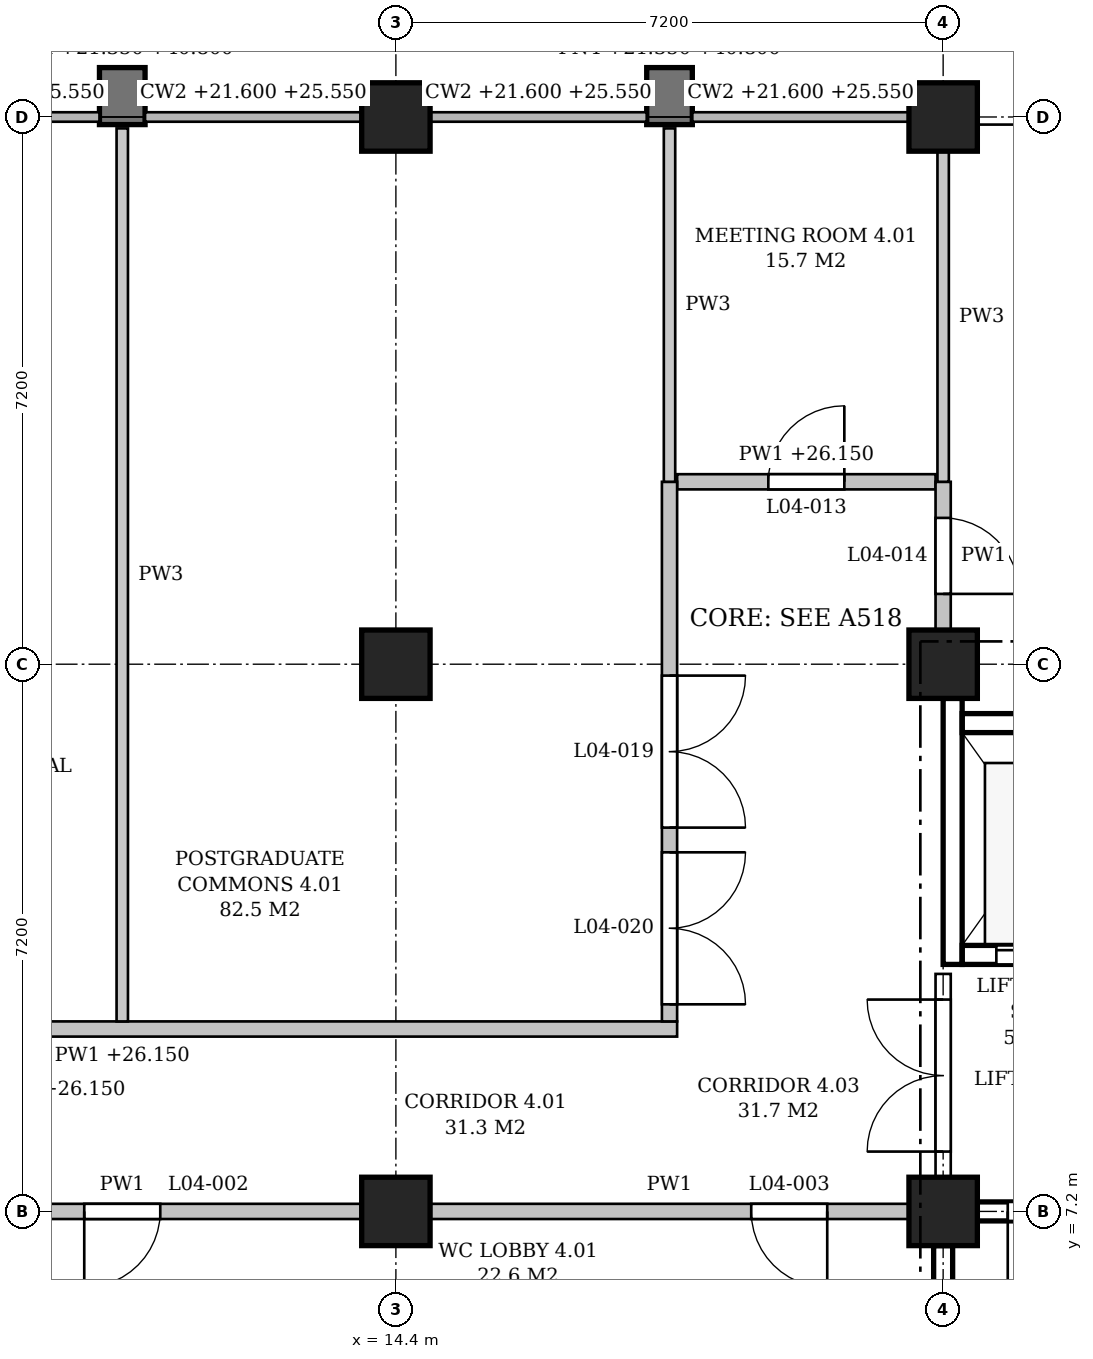
"""IFC4 building model, lengths in metres.
Left out: names, types, materials, properties, quantities, classifications, styles, units other than length and angle.
Written with IfcOpenShell. Run it as: python <this file> out.ifc"""

import sys

from ifc_helpers import new_model, si_unit, direction, frame, frame_2d, origin, origin_2d, place, context, subcontext, project, spatial, polyline, rectangle, outline, extrude, element, fill, save


model = new_model("IFC4")
c1 = context("Model", 3, precision=1e-05, world=origin(), true_north=direction((0.0, 1.0)))
c2 = subcontext(c1, "Body", "Model", "MODEL_VIEW")
j1 = project(units=[si_unit("LENGTHUNIT", "METRE"), si_unit("PLANEANGLEUNIT", "RADIAN")], contexts=[c1])
p1 = place(None, origin())
s1 = spatial("IfcSite", under=j1, at=p1, CompositionType="ELEMENT")
p2 = place(p1, origin())
s2 = spatial("IfcBuilding", under=s1, at=p2, CompositionType="ELEMENT")
p3 = place(p2, frame((0.0, 0.0, 21.6)))
s3 = spatial("IfcBuildingStorey", under=s2, at=p3, CompositionType="ELEMENT", Elevation=21.6)
for number, where, z_axis, x_axis in (
    (1, (14.4, 7.2, 0.0), (0.0, 0.0, 1.0), (1.0, 0.0, 0.0)),
    (2, (14.4, 14.4, 0.0), (0.0, 0.0, 1.0), (1.0, 0.0, 0.0)),
    (3, (14.4, 21.6, 0.0), (0.0, 0.0, 1.0), (1.0, 0.0, 0.0)),
    (4, (21.6, 7.2, 0.0), (0.0, 0.0, 1.0), (1.0, 0.0, 0.0)),
    (5, (21.6, 14.4, 0.0), (0.0, 0.0, 1.0), (1.0, 0.0, 0.0)),
    (6, (21.6, 21.6, 0.0), (0.0, 0.0, 1.0), (1.0, 0.0, 0.0)),
):
    element("IfcColumn", number, at=place(p3, frame(where, z_axis=z_axis, x_axis=x_axis)), inside=s3, PredefinedType="COLUMN", context=c2, shape_type="SweptSolid", body=[
        extrude(rectangle(XDim=0.9, YDim=0.9, at=origin_2d()), origin(), (0.0, 0.0, 1.0), 4.8),
    ])
for number, where, z_axis, x_axis in (
    (7, (18.0, 21.5, -0.25), (0.0, 0.0, 1.0), (0.0, 1.0, 0.0)),
    (8, (10.8, 21.5, -0.25), (0.0, 0.0, 1.0), (0.0, 1.0, 0.0)),
):
    element("IfcWall", number, at=place(p3, frame(where, z_axis=z_axis, x_axis=x_axis)), inside=s3, PredefinedType="POLYGONAL", context=c2, shape_type="SweptSolid", body=[
        extrude(outline(polyline([(0.75, 0.0), (0.75, 19.0), (0.45, 19.45), (0.3, 19.45), (0.3, 18.6), (0.0, 18.6), (0.0, 14.65), (0.35, 14.65), (0.35, 13.8), (0.0, 13.8), (0.0, 9.85), (0.35, 9.85), (0.35, 9.0), (0.0, 9.0), (0.0, 5.05), (0.35, 5.05), (0.35, 4.2), (0.0, 4.2), (0.0, 0.25), (0.35, 0.25), (0.35, 0.0), (0.75, 0.0)])), frame((0.0, 0.3, 0.0), z_axis=(0.0, -1.0, 0.0), x_axis=(1.0, 0.0, 0.0)), (0.0, 0.0, 1.0), 0.6),
    ])
p4 = place(p3, frame((22.05, 7.2, 0.0), z_axis=(0.0, 0.0, 1.0), x_axis=(1.0, 0.0, 0.0)))
e9 = element("IfcWall", 9, at=p4, inside=s3, PredefinedType="SHEAR", context=c2, shape_type="SweptSolid", body=[
    extrude(rectangle(XDim=6.3, YDim=0.25, at=frame_2d((3.15, 0.0))), origin(), (0.0, 0.0, 1.0), 3.8),
])
p5 = place(p4, frame((0.4, 0.0, 0.0)))
e10 = element("IfcOpeningElement", 10, at=p5, cuts=e9, PredefinedType="OPENING", context=c2, shape_type="SweptSolid", body=[
    extrude(rectangle(XDim=1.1, YDim=2.1, at=frame_2d((0.55, 1.05))), frame((0.0, 0.135, 0.0), z_axis=(0.0, -1.0, 0.0), x_axis=(1.0, 0.0, 0.0)), (0.0, 0.0, 1.0), 0.27),
])
p6 = place(p3, frame((21.6, 0.45, 0.0), z_axis=(0.0, 0.0, 1.0), x_axis=(0.0, 1.0, 0.0)))
e11 = element("IfcWall", 11, at=p6, inside=s3, PredefinedType="SHEAR", context=c2, shape_type="SweptSolid", body=[
    extrude(rectangle(XDim=6.3, YDim=0.25, at=frame_2d((3.15, 0.0))), origin(), (0.0, 0.0, 1.0), 3.8),
])
p7 = place(p3, frame((21.725, 10.45, -0.25), z_axis=(0.0, 0.0, 1.0), x_axis=(0.0, 1.0, 0.0)))
e12 = element("IfcWall", 12, at=p7, inside=s3, PredefinedType="SHEAR", context=c2, shape_type="SweptSolid", body=[
    extrude(rectangle(XDim=3.5, YDim=0.25, at=frame_2d((1.75, 0.0))), origin(), (0.0, 0.0, 1.0), 4.05),
])
p8 = place(p3, frame((21.85, 10.575, -0.25), z_axis=(0.0, 0.0, 1.0), x_axis=(1.0, 0.0, 0.0)))
e13 = element("IfcWall", 13, at=p8, inside=s3, PredefinedType="SHEAR", context=c2, shape_type="SweptSolid", body=[
    extrude(rectangle(XDim=2.0, YDim=0.25, at=frame_2d((1.0, 0.0))), origin(), (0.0, 0.0, 1.0), 4.8),
])
p9 = place(p8, frame((0.45, 0.0, 0.25)))
e14 = element("IfcOpeningElement", 14, at=p9, cuts=e13, PredefinedType="OPENING", context=c2, shape_type="SweptSolid", body=[
    extrude(rectangle(XDim=1.1, YDim=2.1, at=frame_2d((0.55, 1.05))), frame((0.0, 0.135, 0.0), z_axis=(0.0, -1.0, 0.0), x_axis=(1.0, 0.0, 0.0)), (0.0, 0.0, 1.0), 0.27),
])
p10 = place(p3, frame((21.85, 13.625, -0.25), z_axis=(0.0, 0.0, 1.0), x_axis=(1.0, 0.0, 0.0)))
e15 = element("IfcWall", 15, at=p10, inside=s3, PredefinedType="SHEAR", context=c2, shape_type="SweptSolid", body=[
    extrude(rectangle(XDim=2.0, YDim=0.25, at=frame_2d((1.0, 0.0))), origin(), (0.0, 0.0, 1.0), 4.8),
])
p11 = place(p3, frame((7.65, 7.2, 0.0), z_axis=(0.0, 0.0, 1.0), x_axis=(1.0, 0.0, 0.0)))
e16 = element("IfcWall", 16, at=p11, inside=s3, PredefinedType="PARTITIONING", context=c2, shape_type="SweptSolid", body=[
    extrude(rectangle(XDim=6.3, YDim=0.2, at=frame_2d((3.15, 0.0))), origin(), (0.0, 0.0, 1.0), 3.8),
])
p12 = place(p11, frame((2.65, 0.0, 0.0)))
e17 = element("IfcOpeningElement", 17, at=p12, cuts=e16, PredefinedType="OPENING", context=c2, shape_type="SweptSolid", body=[
    extrude(rectangle(XDim=1.0, YDim=2.1, at=frame_2d((0.5, 1.05))), frame((0.0, 0.11, 0.0), z_axis=(0.0, -1.0, 0.0), x_axis=(1.0, 0.0, 0.0)), (0.0, 0.0, 1.0), 0.22),
])
p13 = place(p3, frame((14.85, 7.2, 0.0), z_axis=(0.0, 0.0, 1.0), x_axis=(1.0, 0.0, 0.0)))
e18 = element("IfcWall", 18, at=p13, inside=s3, PredefinedType="PARTITIONING", context=c2, shape_type="SweptSolid", body=[
    extrude(rectangle(XDim=6.3, YDim=0.2, at=frame_2d((3.15, 0.0))), origin(), (0.0, 0.0, 1.0), 3.8),
])
p14 = place(p13, frame((4.225, 0.0, 0.0)))
e19 = element("IfcOpeningElement", 19, at=p14, cuts=e18, PredefinedType="OPENING", context=c2, shape_type="SweptSolid", body=[
    extrude(rectangle(XDim=1.0, YDim=2.1, at=frame_2d((0.5, 1.05))), frame((0.0, 0.11, 0.0), z_axis=(0.0, -1.0, 0.0), x_axis=(1.0, 0.0, 0.0)), (0.0, 0.0, 1.0), 0.22),
])
p15 = place(p3, frame((3.5, 9.6, 0.0), z_axis=(0.0, 0.0, 1.0), x_axis=(1.0, 0.0, 0.0)))
e20 = element("IfcWall", 20, at=p15, inside=s3, PredefinedType="PARTITIONING", context=c2, shape_type="SweptSolid", body=[
    extrude(outline(polyline([(0.0, 0.0), (14.6, 0.0), (14.6, 4.55), (11.15, 4.55), (11.15, 3.8), (10.65, 3.8), (10.65, 4.55), (3.95, 4.55), (3.95, 3.8), (3.45, 3.8), (3.45, 4.55), (0.0, 4.55), (0.0, 0.0)])), frame((0.0, 0.1, 0.0), z_axis=(0.0, -1.0, 0.0), x_axis=(1.0, 0.0, 0.0)), (0.0, 0.0, 1.0), 0.2),
])
p16 = place(p15, frame((1.4, 0.0, 0.0)))
e21 = element("IfcOpeningElement", 21, at=p16, cuts=e20, PredefinedType="OPENING", context=c2, shape_type="SweptSolid", body=[
    extrude(rectangle(XDim=1.0, YDim=2.1, at=frame_2d((0.5, 1.05))), frame((0.0, 0.11, 0.0), z_axis=(0.0, -1.0, 0.0), x_axis=(1.0, 0.0, 0.0)), (0.0, 0.0, 1.0), 0.22),
])
p17 = place(p15, frame((5.0, 0.0, 0.0)))
e22 = element("IfcOpeningElement", 22, at=p17, cuts=e20, PredefinedType="OPENING", context=c2, shape_type="SweptSolid", body=[
    extrude(rectangle(XDim=1.0, YDim=2.1, at=frame_2d((0.5, 1.05))), frame((0.0, 0.11, 0.0), z_axis=(0.0, -1.0, 0.0), x_axis=(1.0, 0.0, 0.0)), (0.0, 0.0, 1.0), 0.22),
])
p18 = place(p3, frame((18.1, 16.8, 0.0), z_axis=(0.0, 0.0, 1.0), x_axis=(1.0, 0.0, 0.0)))
e23 = element("IfcWall", 23, at=p18, inside=s3, PredefinedType="PARTITIONING", context=c2, shape_type="SweptSolid", body=[
    extrude(outline(polyline([(0.0, 0.0), (3.4, 0.0), (3.4, 3.8), (3.25, 3.8), (3.25, 4.55), (0.0, 4.55), (0.0, 0.0)])), frame((0.0, 0.1, 0.0), z_axis=(0.0, -1.0, 0.0), x_axis=(1.0, 0.0, 0.0)), (0.0, 0.0, 1.0), 0.2),
])
p19 = place(p18, frame((1.2, 0.0, 0.0)))
e24 = element("IfcOpeningElement", 24, at=p19, cuts=e23, PredefinedType="OPENING", context=c2, shape_type="SweptSolid", body=[
    extrude(rectangle(XDim=1.0, YDim=2.1, at=frame_2d((0.5, 1.05))), frame((0.0, 0.11, 0.0), z_axis=(0.0, -1.0, 0.0), x_axis=(1.0, 0.0, 0.0)), (0.0, 0.0, 1.0), 0.22),
])
p20 = place(p3, frame((10.8, 9.7, 0.0), z_axis=(0.0, 0.0, 1.0), x_axis=(0.0, 1.0, 0.0)))
e25 = element("IfcWall", 25, at=p20, inside=s3, PredefinedType="PARTITIONING", context=c2, shape_type="SweptSolid", body=[
    extrude(rectangle(XDim=11.75, YDim=0.15, at=frame_2d((5.875, 0.0))), origin(), (0.0, 0.0, 1.0), 3.8),
])
p21 = place(p3, frame((18.0, 9.7, 0.0), z_axis=(0.0, 0.0, 1.0), x_axis=(0.0, 1.0, 0.0)))
e26 = element("IfcWall", 26, at=p21, inside=s3, PredefinedType="PARTITIONING", context=c2, shape_type="SweptSolid", body=[
    extrude(outline(polyline([(0.0, 0.0), (7.1, 0.0), (7.1, 4.55), (4.95, 4.55), (4.95, 3.8), (4.45, 3.8), (4.45, 4.55), (0.0, 4.55), (0.0, 0.0)])), frame((0.0, 0.1, 0.0), z_axis=(0.0, -1.0, 0.0), x_axis=(1.0, 0.0, 0.0)), (0.0, 0.0, 1.0), 0.2),
])
p22 = place(p21, frame((2.55, 0.0, 0.0)))
e27 = element("IfcOpeningElement", 27, at=p22, cuts=e26, PredefinedType="OPENING", context=c2, shape_type="SweptSolid", body=[
    extrude(rectangle(XDim=2.0, YDim=2.1, at=frame_2d((1.0, 1.05))), frame((0.0, 0.11, 0.0), z_axis=(0.0, -1.0, 0.0), x_axis=(1.0, 0.0, 0.0)), (0.0, 0.0, 1.0), 0.22),
])
p23 = place(p21, frame((0.225, 0.0, 0.0)))
e28 = element("IfcOpeningElement", 28, at=p23, cuts=e26, PredefinedType="OPENING", context=c2, shape_type="SweptSolid", body=[
    extrude(rectangle(XDim=2.0, YDim=2.1, at=frame_2d((1.0, 1.05))), frame((0.0, 0.11, 0.0), z_axis=(0.0, -1.0, 0.0), x_axis=(1.0, 0.0, 0.0)), (0.0, 0.0, 1.0), 0.22),
])
p24 = place(p3, frame((18.0, 16.8, 0.0), z_axis=(0.0, 0.0, 1.0), x_axis=(0.0, 1.0, 0.0)))
e29 = element("IfcWall", 29, at=p24, inside=s3, PredefinedType="PARTITIONING", context=c2, shape_type="SweptSolid", body=[
    extrude(rectangle(XDim=4.65, YDim=0.15, at=frame_2d((2.325, 0.0))), origin(), (0.0, 0.0, 1.0), 3.8),
])
p25 = place(p3, frame((21.6, 7.65, 0.0), z_axis=(0.0, 0.0, 1.0), x_axis=(0.0, 1.0, 0.0)))
e30 = element("IfcWall", 30, at=p25, inside=s3, PredefinedType="PARTITIONING", context=c2, shape_type="SweptSolid", body=[
    extrude(rectangle(XDim=2.675, YDim=0.2, at=frame_2d((1.337, 0.0))), origin(), (0.0, 0.0, 1.0), 3.8),
])
p26 = place(p25, frame((0.337, 0.0, 0.0)))
e31 = element("IfcOpeningElement", 31, at=p26, cuts=e30, PredefinedType="OPENING", context=c2, shape_type="SweptSolid", body=[
    extrude(rectangle(XDim=2.0, YDim=2.4, at=frame_2d((1.0, 1.2))), frame((0.0, 0.11, 0.0), z_axis=(0.0, -1.0, 0.0), x_axis=(1.0, 0.0, 0.0)), (0.0, 0.0, 1.0), 0.22),
])
p27 = place(p3, frame((21.6, 14.85, 0.0), z_axis=(0.0, 0.0, 1.0), x_axis=(0.0, 1.0, 0.0)))
e32 = element("IfcWall", 32, at=p27, inside=s3, PredefinedType="PARTITIONING", context=c2, shape_type="SweptSolid", body=[
    extrude(rectangle(XDim=1.95, YDim=0.2, at=frame_2d((0.975, 0.0))), origin(), (0.0, 0.0, 1.0), 3.8),
])
p28 = place(p27, frame((0.475, 0.0, 0.0)))
e33 = element("IfcOpeningElement", 33, at=p28, cuts=e32, PredefinedType="OPENING", context=c2, shape_type="SweptSolid", body=[
    extrude(rectangle(XDim=1.0, YDim=2.1, at=frame_2d((0.5, 1.05))), frame((0.0, 0.11, 0.0), z_axis=(0.0, -1.0, 0.0), x_axis=(1.0, 0.0, 0.0)), (0.0, 0.0, 1.0), 0.22),
])
p29 = place(p3, frame((21.6, 16.8, 0.0), z_axis=(0.0, 0.0, 1.0), x_axis=(0.0, 1.0, 0.0)))
e34 = element("IfcWall", 34, at=p29, inside=s3, PredefinedType="PARTITIONING", context=c2, shape_type="SweptSolid", body=[
    extrude(rectangle(XDim=4.35, YDim=0.15, at=frame_2d((2.175, 0.0))), origin(), (0.0, 0.0, 1.0), 3.8),
])
p30 = place(p5, frame((1.1, 0.0, 0.0), z_axis=(0.0, 0.0, 1.0), x_axis=(-1.0, 0.0, 0.0)))
e35 = element("IfcDoor", 35, at=p30, inside=s3, OperationType="SINGLE_SWING_RIGHT", PredefinedType="DOOR", context=c2, shape_type="SweptSolid", body=[
    extrude(rectangle(XDim=1.1, YDim=2.1, at=frame_2d((0.55, 1.05))), frame((0.0, 0.025, 0.0), z_axis=(0.0, -1.0, 0.0), x_axis=(1.0, 0.0, 0.0)), (0.0, 0.0, 1.0), 0.05),
])
fill(e10, e35)
p31 = place(p9, origin())
e36 = element("IfcDoor", 36, at=p31, inside=s3, OperationType="SLIDING_TO_LEFT", PredefinedType="DOOR", context=c2, shape_type="SweptSolid", body=[
    extrude(rectangle(XDim=1.1, YDim=2.1, at=frame_2d((0.55, 1.05))), frame((0.0, 0.025, 0.0), z_axis=(0.0, -1.0, 0.0), x_axis=(1.0, 0.0, 0.0)), (0.0, 0.0, 1.0), 0.05),
])
fill(e14, e36)
p32 = place(p26, origin())
e37 = element("IfcDoor", 37, at=p32, inside=s3, OperationType="DOUBLE_DOOR_SINGLE_SWING", PredefinedType="DOOR", context=c2, shape_type="SweptSolid", body=[
    extrude(rectangle(XDim=2.0, YDim=2.4, at=frame_2d((1.0, 1.2))), frame((0.0, 0.025, 0.0), z_axis=(0.0, -1.0, 0.0), x_axis=(1.0, 0.0, 0.0)), (0.0, 0.0, 1.0), 0.05),
])
fill(e31, e37)
p33 = place(p12, frame((1.0, 0.0, 0.0), z_axis=(0.0, 0.0, 1.0), x_axis=(-1.0, 0.0, 0.0)))
e38 = element("IfcDoor", 38, at=p33, inside=s3, OperationType="SINGLE_SWING_RIGHT", PredefinedType="DOOR", context=c2, shape_type="SweptSolid", body=[
    extrude(rectangle(XDim=1.0, YDim=2.1, at=frame_2d((0.5, 1.05))), frame((0.0, 0.025, 0.0), z_axis=(0.0, -1.0, 0.0), x_axis=(1.0, 0.0, 0.0)), (0.0, 0.0, 1.0), 0.05),
])
fill(e17, e38)
p34 = place(p14, frame((1.0, 0.0, 0.0), z_axis=(0.0, 0.0, 1.0), x_axis=(-1.0, 0.0, 0.0)))
e39 = element("IfcDoor", 39, at=p34, inside=s3, OperationType="SINGLE_SWING_LEFT", PredefinedType="DOOR", context=c2, shape_type="SweptSolid", body=[
    extrude(rectangle(XDim=1.0, YDim=2.1, at=frame_2d((0.5, 1.05))), frame((0.0, 0.025, 0.0), z_axis=(0.0, -1.0, 0.0), x_axis=(1.0, 0.0, 0.0)), (0.0, 0.0, 1.0), 0.05),
])
fill(e19, e39)
p35 = place(p19, origin())
e40 = element("IfcDoor", 40, at=p35, inside=s3, OperationType="SINGLE_SWING_RIGHT", PredefinedType="DOOR", context=c2, shape_type="SweptSolid", body=[
    extrude(rectangle(XDim=1.0, YDim=2.1, at=frame_2d((0.5, 1.05))), frame((0.0, 0.025, 0.0), z_axis=(0.0, -1.0, 0.0), x_axis=(1.0, 0.0, 0.0)), (0.0, 0.0, 1.0), 0.05),
])
fill(e24, e40)
p36 = place(p28, frame((1.0, 0.0, 0.0), z_axis=(0.0, 0.0, 1.0), x_axis=(-1.0, 0.0, 0.0)))
e41 = element("IfcDoor", 41, at=p36, inside=s3, OperationType="SINGLE_SWING_RIGHT", PredefinedType="DOOR", context=c2, shape_type="SweptSolid", body=[
    extrude(rectangle(XDim=1.0, YDim=2.1, at=frame_2d((0.5, 1.05))), frame((0.0, 0.025, 0.0), z_axis=(0.0, -1.0, 0.0), x_axis=(1.0, 0.0, 0.0)), (0.0, 0.0, 1.0), 0.05),
])
fill(e33, e41)
p37 = place(p22, origin())
e42 = element("IfcDoor", 42, at=p37, inside=s3, OperationType="DOUBLE_DOOR_SINGLE_SWING", PredefinedType="DOOR", context=c2, shape_type="SweptSolid", body=[
    extrude(rectangle(XDim=2.0, YDim=2.1, at=frame_2d((1.0, 1.05))), frame((0.0, 0.025, 0.0), z_axis=(0.0, -1.0, 0.0), x_axis=(1.0, 0.0, 0.0)), (0.0, 0.0, 1.0), 0.05),
])
fill(e27, e42)
p38 = place(p23, origin())
e43 = element("IfcDoor", 43, at=p38, inside=s3, OperationType="DOUBLE_DOOR_SINGLE_SWING", PredefinedType="DOOR", context=c2, shape_type="SweptSolid", body=[
    extrude(rectangle(XDim=2.0, YDim=2.1, at=frame_2d((1.0, 1.05))), frame((0.0, 0.025, 0.0), z_axis=(0.0, -1.0, 0.0), x_axis=(1.0, 0.0, 0.0)), (0.0, 0.0, 1.0), 0.05),
])
fill(e28, e43)
save(model, sys.argv[1])
